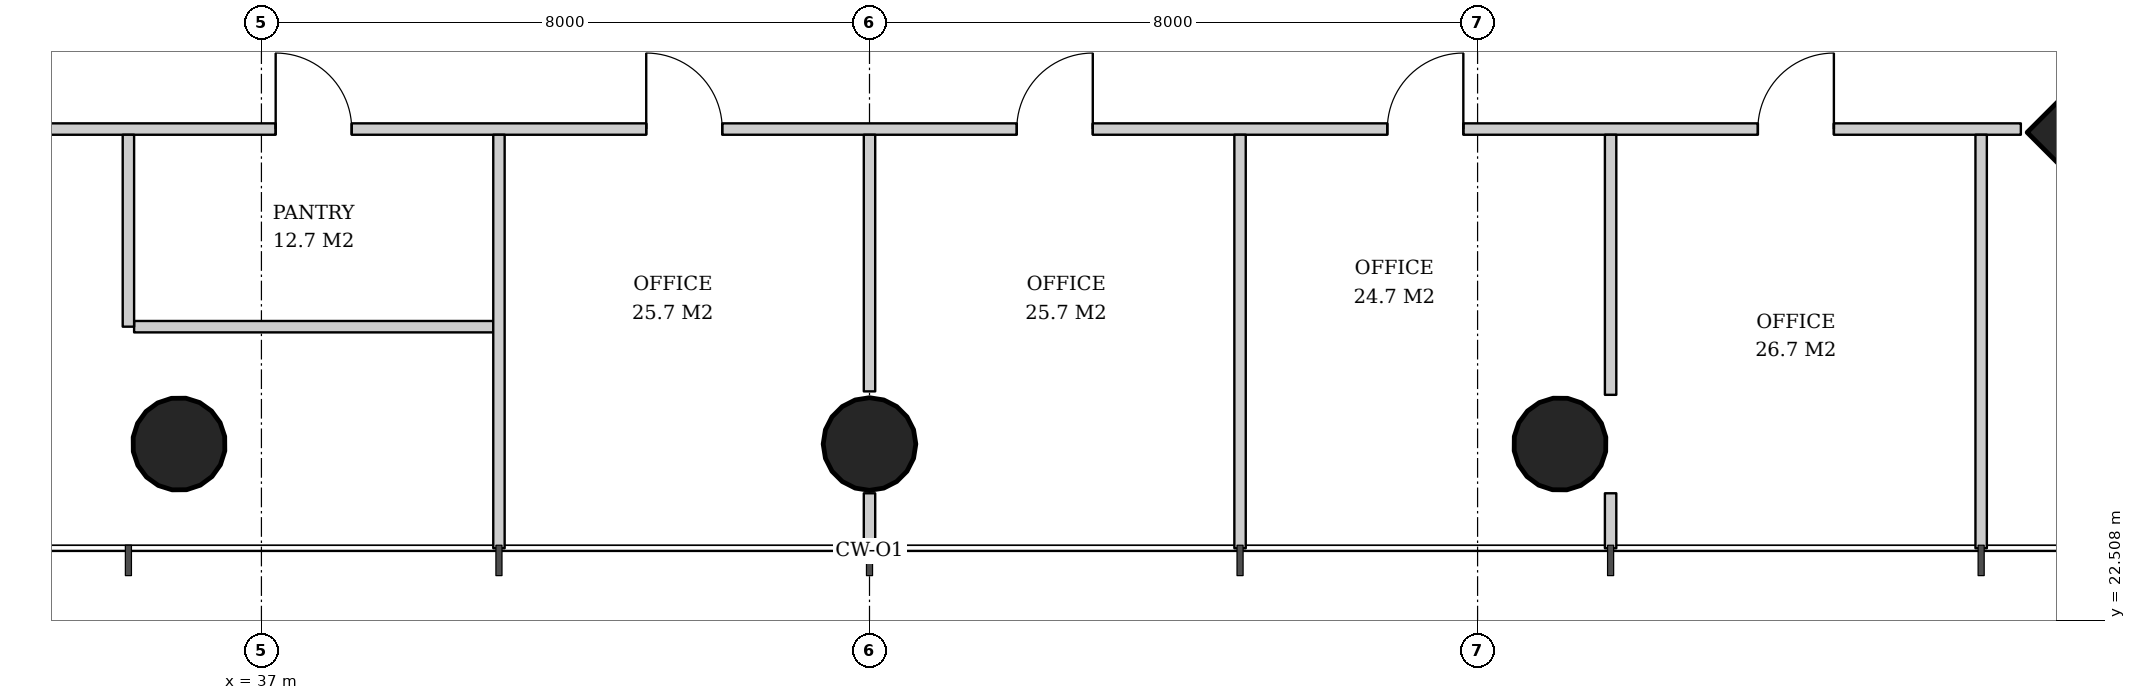
"""IFC4 building model, lengths in metres.
Left out: names, types, materials, properties, quantities, classifications, styles, units other than length and angle.
Written with IfcOpenShell. Run it as: python <this file> out.ifc"""

import sys

from ifc_helpers import new_model, si_unit, direction, frame, frame_2d, origin, origin_2d, place, context, subcontext, project, spatial, rectangle, hollow_circle, extrude, element, fill, save


model = new_model("IFC4")
c1 = context("Model", 3, precision=1e-05, world=origin(), true_north=direction((0.0, 1.0)))
c2 = subcontext(c1, "Body", "Model", "MODEL_VIEW")
j1 = project(units=[si_unit("LENGTHUNIT", "METRE"), si_unit("PLANEANGLEUNIT", "RADIAN")], contexts=[c1])
p1 = place(None, origin())
s1 = spatial("IfcSite", under=j1, at=p1, CompositionType="ELEMENT")
p2 = place(p1, origin())
s2 = spatial("IfcBuilding", under=s1, at=p2, CompositionType="ELEMENT")
p3 = place(p2, frame((0.0, 0.0, 108.4)))
s3 = spatial("IfcBuildingStorey", under=s2, at=p3, CompositionType="ELEMENT", Elevation=108.4)
p4 = place(p3, frame((62.107, 28.893, 0.0), z_axis=(-0.031962158256, 0.031962158256, 0.998977898093), x_axis=(-0.707106781187, -0.707106781187, 0.0)))
e1 = element("IfcColumn", 1, at=p4, inside=s3, PredefinedType="COLUMN", context=c2, shape_type="SweptSolid", body=[
    extrude(rectangle(XDim=2.6, YDim=2.6, at=origin_2d()), origin(), (0.0, 0.0, 1.0), 3.804),
])
p5 = place(p3, frame((35.896, 24.793, 0.0), z_axis=(0.015923048203, 0.031910302246, 0.999363892257), x_axis=(-0.894786976326, 0.446493300058, 0.0)))
e2 = element("IfcColumn", 2, at=p5, inside=s3, PredefinedType="COLUMN", context=c2, shape_type="SweptSolid", body=[
    extrude(hollow_circle(Radius=0.61, WallThickness=0.04, at=origin_2d()), origin(), (0.0, 0.0, 1.0), 3.802),
])
p6 = place(p3, frame((45.0, 24.793, 0.0), z_axis=(0.0, 0.031914348339, 0.999490607445), x_axis=(-1.0, 0.0, 0.0)))
e3 = element("IfcColumn", 3, at=p6, inside=s3, PredefinedType="COLUMN", context=c2, shape_type="SweptSolid", body=[
    extrude(hollow_circle(Radius=0.61, WallThickness=0.04, at=origin_2d()), origin(), (0.0, 0.0, 1.0), 3.802),
])
p7 = place(p3, frame((54.104, 24.793, 0.0), z_axis=(-0.015923048203, 0.031910302246, 0.999363892257), x_axis=(-0.894786976326, -0.446493300058, 0.0)))
e4 = element("IfcColumn", 4, at=p7, inside=s3, PredefinedType="COLUMN", context=c2, shape_type="SweptSolid", body=[
    extrude(hollow_circle(Radius=0.61, WallThickness=0.04, at=origin_2d()), origin(), (0.0, 0.0, 1.0), 3.802),
])
p8 = place(p3, frame((35.325, 26.375, 0.0), z_axis=(0.0, 0.0, 1.0), x_axis=(1.0, 0.0, 0.0)))
e5 = element("IfcWall", 5, at=p8, inside=s3, PredefinedType="PARTITIONING", context=c2, shape_type="SweptSolid", body=[
    extrude(rectangle(XDim=4.725, YDim=0.15, at=frame_2d((2.363, 0.0))), origin(), (0.0, 0.0, 1.0), 2.858),
])
p9 = place(p3, frame((29.853, 28.975, 0.0), z_axis=(0.0, 0.0, 1.0), x_axis=(1.0, 0.0, 0.0)))
e6 = element("IfcWall", 6, at=p9, inside=s3, PredefinedType="PARTITIONING", context=c2, shape_type="SweptSolid", body=[
    extrude(rectangle(XDim=30.294, YDim=0.15, at=frame_2d((15.147, 0.0))), origin(), (0.0, 0.0, 1.0), 2.72),
])
p10 = place(p9, frame((2.46, 0.0, 0.0)))
e7 = element("IfcOpeningElement", 7, at=p10, cuts=e6, PredefinedType="OPENING", context=c2, shape_type="SweptSolid", body=[
    extrude(rectangle(XDim=1.0, YDim=2.1, at=frame_2d((0.5, 1.05))), frame((0.0, 0.085, 0.0), z_axis=(0.0, -1.0, 0.0), x_axis=(1.0, 0.0, 0.0)), (0.0, 0.0, 1.0), 0.17),
])
p11 = place(p9, frame((7.335, 0.0, 0.0)))
e8 = element("IfcOpeningElement", 8, at=p11, cuts=e6, PredefinedType="OPENING", context=c2, shape_type="SweptSolid", body=[
    extrude(rectangle(XDim=1.0, YDim=2.1, at=frame_2d((0.5, 1.05))), frame((0.0, 0.085, 0.0), z_axis=(0.0, -1.0, 0.0), x_axis=(1.0, 0.0, 0.0)), (0.0, 0.0, 1.0), 0.17),
])
p12 = place(p9, frame((12.21, 0.0, 0.0)))
e9 = element("IfcOpeningElement", 9, at=p12, cuts=e6, PredefinedType="OPENING", context=c2, shape_type="SweptSolid", body=[
    extrude(rectangle(XDim=1.0, YDim=2.1, at=frame_2d((0.5, 1.05))), frame((0.0, 0.085, 0.0), z_axis=(0.0, -1.0, 0.0), x_axis=(1.0, 0.0, 0.0)), (0.0, 0.0, 1.0), 0.17),
])
p13 = place(p9, frame((17.085, 0.0, 0.0)))
e10 = element("IfcOpeningElement", 10, at=p13, cuts=e6, PredefinedType="OPENING", context=c2, shape_type="SweptSolid", body=[
    extrude(rectangle(XDim=1.0, YDim=2.1, at=frame_2d((0.5, 1.05))), frame((0.0, 0.085, 0.0), z_axis=(0.0, -1.0, 0.0), x_axis=(1.0, 0.0, 0.0)), (0.0, 0.0, 1.0), 0.17),
])
p14 = place(p9, frame((21.96, 0.0, 0.0)))
e11 = element("IfcOpeningElement", 11, at=p14, cuts=e6, PredefinedType="OPENING", context=c2, shape_type="SweptSolid", body=[
    extrude(rectangle(XDim=1.0, YDim=2.1, at=frame_2d((0.5, 1.05))), frame((0.0, 0.085, 0.0), z_axis=(0.0, -1.0, 0.0), x_axis=(1.0, 0.0, 0.0)), (0.0, 0.0, 1.0), 0.17),
])
p15 = place(p9, frame((26.835, 0.0, 0.0)))
e12 = element("IfcOpeningElement", 12, at=p15, cuts=e6, PredefinedType="OPENING", context=c2, shape_type="SweptSolid", body=[
    extrude(rectangle(XDim=1.0, YDim=2.1, at=frame_2d((0.5, 1.05))), frame((0.0, 0.085, 0.0), z_axis=(0.0, -1.0, 0.0), x_axis=(1.0, 0.0, 0.0)), (0.0, 0.0, 1.0), 0.17),
])
p16 = place(p3, frame((35.25, 28.9, 0.0), z_axis=(0.0, 0.0, 1.0), x_axis=(0.0, -1.0, 0.0)))
e13 = element("IfcWall", 13, at=p16, inside=s3, PredefinedType="PARTITIONING", context=c2, shape_type="SweptSolid", body=[
    extrude(rectangle(XDim=2.525, YDim=0.15, at=frame_2d((1.262, 0.0))), origin(), (0.0, 0.0, 1.0), 3.62),
])
p17 = place(p3, frame((40.125, 28.9, 0.0), z_axis=(0.0, 0.0, 1.0), x_axis=(0.0, -1.0, 0.0)))
e14 = element("IfcWall", 14, at=p17, inside=s3, PredefinedType="PARTITIONING", context=c2, shape_type="SweptSolid", body=[
    extrude(rectangle(XDim=5.44, YDim=0.15, at=frame_2d((2.72, 0.0))), origin(), (0.0, 0.0, 1.0), 2.82),
])
p18 = place(p3, frame((45.0, 28.9, 0.0), z_axis=(0.0, 0.0, 1.0), x_axis=(0.0, -1.0, 0.0)))
e15 = element("IfcWall", 15, at=p18, inside=s3, PredefinedType="PARTITIONING", context=c2, shape_type="SweptSolid", body=[
    extrude(rectangle(XDim=3.376, YDim=0.15, at=frame_2d((1.688, 0.0))), origin(), (0.0, 0.0, 1.0), 2.858),
])
p19 = place(p3, frame((45.0, 24.183, 0.0), z_axis=(0.0, 0.0, 1.0), x_axis=(0.0, -1.0, 0.0)))
e16 = element("IfcWall", 16, at=p19, inside=s3, PredefinedType="PARTITIONING", context=c2, shape_type="SweptSolid", body=[
    extrude(rectangle(XDim=0.723, YDim=0.15, at=frame_2d((0.362, 0.0))), origin(), (0.0, 0.0, 1.0), 3.62),
])
p20 = place(p3, frame((49.875, 28.9, 0.0), z_axis=(0.0, 0.0, 1.0), x_axis=(0.0, -1.0, 0.0)))
e17 = element("IfcWall", 17, at=p20, inside=s3, PredefinedType="PARTITIONING", context=c2, shape_type="SweptSolid", body=[
    extrude(rectangle(XDim=5.44, YDim=0.15, at=frame_2d((2.72, 0.0))), origin(), (0.0, 0.0, 1.0), 2.82),
])
p21 = place(p3, frame((54.75, 28.9, 0.0), z_axis=(0.0, 0.0, 1.0), x_axis=(0.0, -1.0, 0.0)))
e18 = element("IfcWall", 18, at=p21, inside=s3, PredefinedType="PARTITIONING", context=c2, shape_type="SweptSolid", body=[
    extrude(rectangle(XDim=3.421, YDim=0.15, at=frame_2d((1.711, 0.0))), origin(), (0.0, 0.0, 1.0), 3.62),
])
p22 = place(p3, frame((54.75, 24.183, 0.0), z_axis=(0.0, 0.0, 1.0), x_axis=(0.0, -1.0, 0.0)))
e19 = element("IfcWall", 19, at=p22, inside=s3, PredefinedType="PARTITIONING", context=c2, shape_type="SweptSolid", body=[
    extrude(rectangle(XDim=0.723, YDim=0.15, at=frame_2d((0.362, 0.0))), origin(), (0.0, 0.0, 1.0), 3.62),
])
p23 = place(p3, frame((59.625, 28.9, 0.0), z_axis=(0.0, 0.0, 1.0), x_axis=(0.0, -1.0, 0.0)))
e20 = element("IfcWall", 20, at=p23, inside=s3, PredefinedType="PARTITIONING", context=c2, shape_type="SweptSolid", body=[
    extrude(rectangle(XDim=5.44, YDim=0.15, at=frame_2d((2.72, 0.0))), origin(), (0.0, 0.0, 1.0), 2.82),
])
p24 = place(p11, origin())
e21 = element("IfcDoor", 21, at=p24, inside=s3, OperationType="SINGLE_SWING_LEFT", PredefinedType="DOOR", context=c2, shape_type="SweptSolid", body=[
    extrude(rectangle(XDim=1.0, YDim=2.1, at=frame_2d((0.5, 1.05))), frame((0.0, 0.025, 0.0), z_axis=(0.0, -1.0, 0.0), x_axis=(1.0, 0.0, 0.0)), (0.0, 0.0, 1.0), 0.05),
])
fill(e8, e21)
p25 = place(p12, origin())
e22 = element("IfcDoor", 22, at=p25, inside=s3, OperationType="SINGLE_SWING_LEFT", PredefinedType="DOOR", context=c2, shape_type="SweptSolid", body=[
    extrude(rectangle(XDim=1.0, YDim=2.1, at=frame_2d((0.5, 1.05))), frame((0.0, 0.025, 0.0), z_axis=(0.0, -1.0, 0.0), x_axis=(1.0, 0.0, 0.0)), (0.0, 0.0, 1.0), 0.05),
])
fill(e9, e22)
p26 = place(p13, origin())
e23 = element("IfcDoor", 23, at=p26, inside=s3, OperationType="SINGLE_SWING_RIGHT", PredefinedType="DOOR", context=c2, shape_type="SweptSolid", body=[
    extrude(rectangle(XDim=1.0, YDim=2.1, at=frame_2d((0.5, 1.05))), frame((0.0, 0.025, 0.0), z_axis=(0.0, -1.0, 0.0), x_axis=(1.0, 0.0, 0.0)), (0.0, 0.0, 1.0), 0.05),
])
fill(e10, e23)
p27 = place(p14, origin())
e24 = element("IfcDoor", 24, at=p27, inside=s3, OperationType="SINGLE_SWING_RIGHT", PredefinedType="DOOR", context=c2, shape_type="SweptSolid", body=[
    extrude(rectangle(XDim=1.0, YDim=2.1, at=frame_2d((0.5, 1.05))), frame((0.0, 0.025, 0.0), z_axis=(0.0, -1.0, 0.0), x_axis=(1.0, 0.0, 0.0)), (0.0, 0.0, 1.0), 0.05),
])
fill(e11, e24)
p28 = place(p15, origin())
e25 = element("IfcDoor", 25, at=p28, inside=s3, OperationType="SINGLE_SWING_RIGHT", PredefinedType="DOOR", context=c2, shape_type="SweptSolid", body=[
    extrude(rectangle(XDim=1.0, YDim=2.1, at=frame_2d((0.5, 1.05))), frame((0.0, 0.025, 0.0), z_axis=(0.0, -1.0, 0.0), x_axis=(1.0, 0.0, 0.0)), (0.0, 0.0, 1.0), 0.05),
])
fill(e12, e25)
save(model, sys.argv[1])
